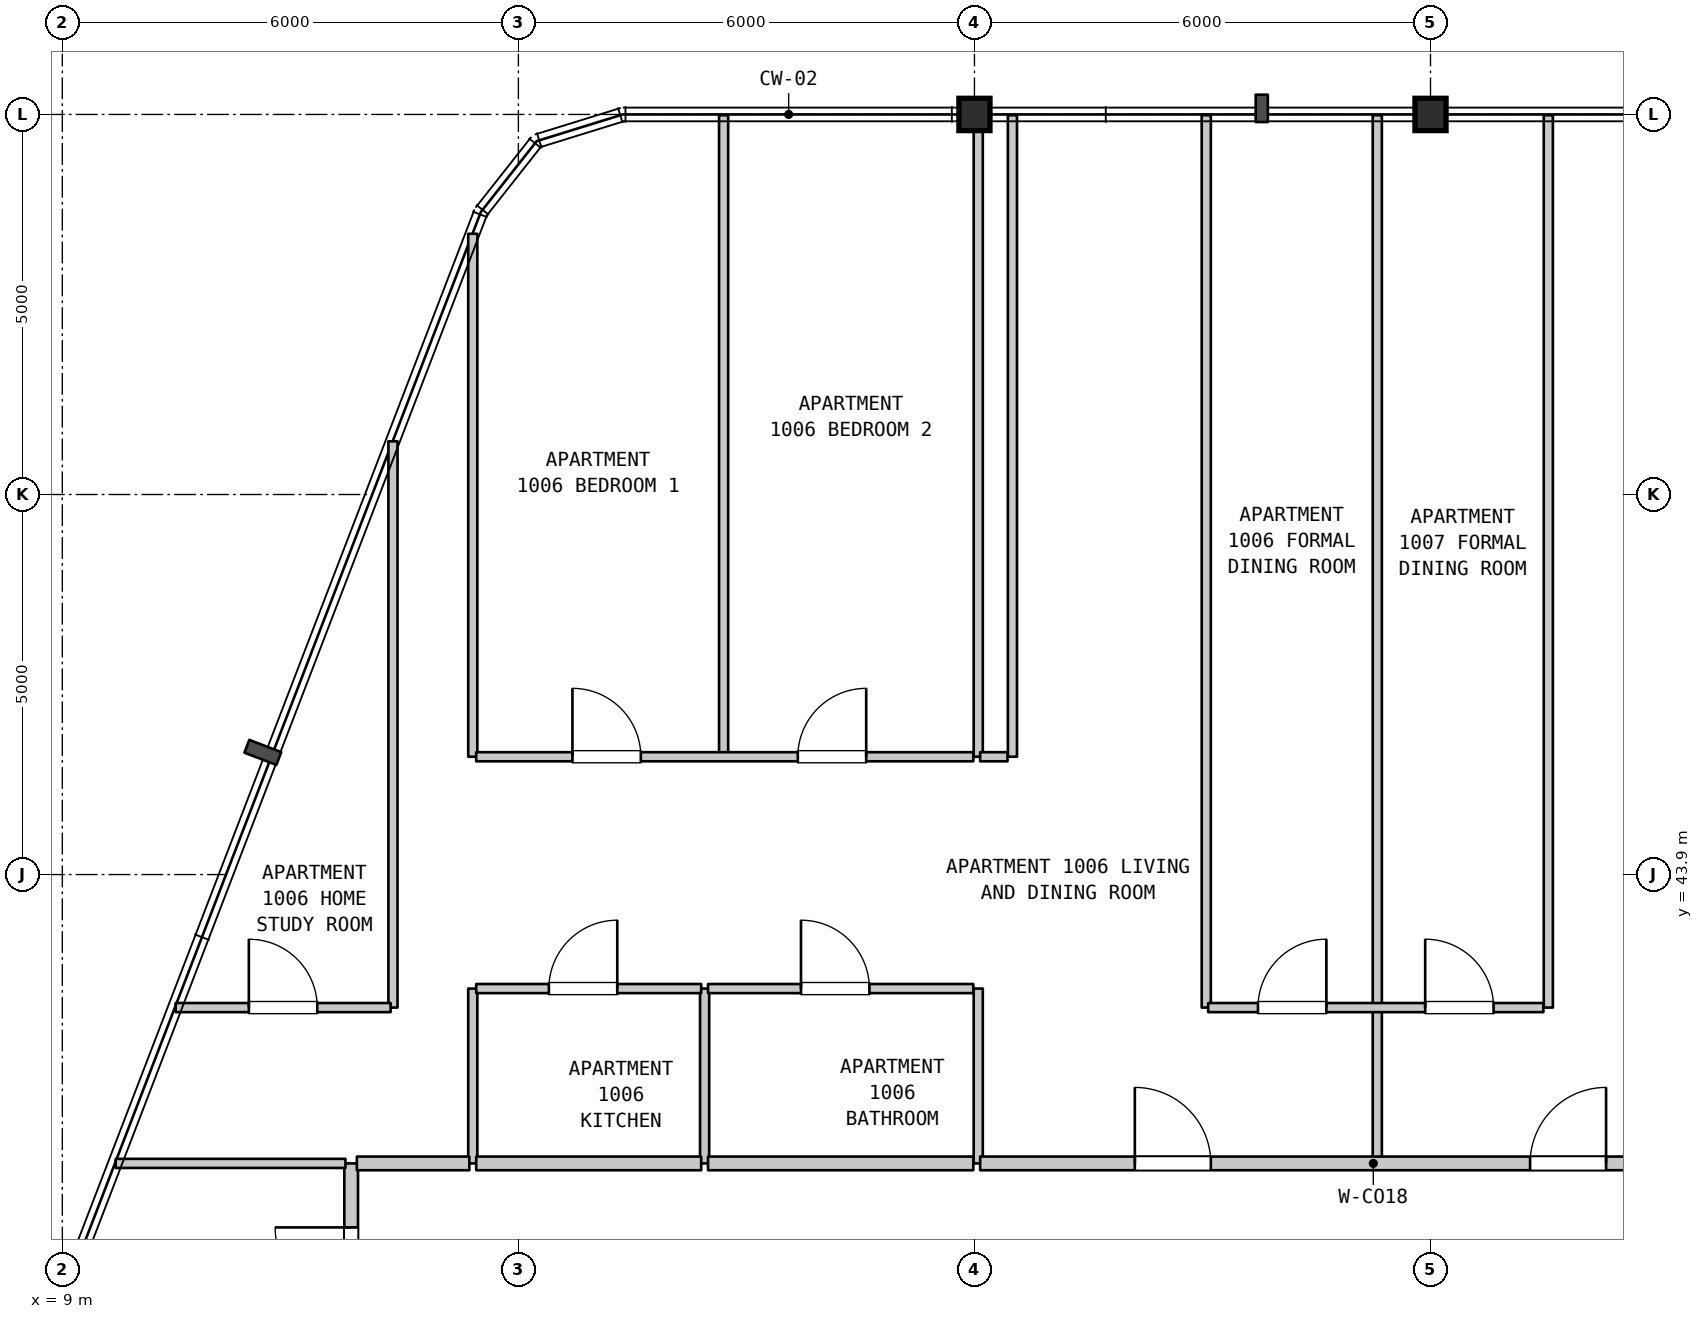
"""IFC4 building model, lengths in metres.
Left out: names, types, materials, properties, quantities, classifications, styles, units other than length and angle.
Written with IfcOpenShell. Run it as: python <this file> out.ifc"""

import sys

from ifc_helpers import new_model, si_unit, direction, frame, frame_2d, origin, origin_2d, place, context, subcontext, project, spatial, rectangle, i_section, extrude, element, fill, save


model = new_model("IFC4")
c1 = context("Model", 3, precision=1e-05, world=origin(), true_north=direction((0.0, 1.0)))
c2 = subcontext(c1, "Body", "Model", "MODEL_VIEW")
j1 = project(units=[si_unit("LENGTHUNIT", "METRE"), si_unit("PLANEANGLEUNIT", "RADIAN")], contexts=[c1])
p1 = place(None, origin())
s1 = spatial("IfcSite", under=j1, at=p1, CompositionType="ELEMENT")
p2 = place(p1, origin())
s2 = spatial("IfcBuilding", under=s1, at=p2, CompositionType="ELEMENT")
p3 = place(p2, frame((0.0, 0.0, 46.2)))
s3 = spatial("IfcBuildingStorey", under=s2, at=p3, CompositionType="ELEMENT", Elevation=46.2)
for number, where, z_axis, x_axis in (
    (1, (21.0, 53.9, 0.0), (0.0, 0.0, 1.0), (1.0, 0.0, 0.0)),
    (2, (27.0, 53.9, 0.0), (0.0, 0.0, 1.0), (1.0, 0.0, 0.0)),
):
    element("IfcColumn", number, at=place(p3, frame(where, z_axis=z_axis, x_axis=x_axis)), inside=s3, PredefinedType="COLUMN", context=c2, shape_type="SweptSolid", body=[
        extrude(i_section(OverallWidth=0.409, OverallDepth=0.425, WebThickness=0.032, FlangeThickness=0.052, FilletRadius=0.015, at=origin_2d()), origin(), (0.0, 0.0, 1.0), 3.7),
    ])
p4 = place(p3, frame((12.8, 37.416, 0.0), z_axis=(0.0, 0.0, 1.0), x_axis=(0.0, 1.0, 0.0)))
e3 = element("IfcWall", 3, at=p4, inside=s3, PredefinedType="STANDARD", context=c2, shape_type="SweptSolid", body=[
    extrude(rectangle(XDim=2.684, YDim=0.18, at=frame_2d((1.342, 0.0))), origin(), (0.0, 0.0, 1.0), 3.385),
])
p5 = place(p4, frame((0.842, 0.0, 0.0)))
e4 = element("IfcOpeningElement", 4, at=p5, cuts=e3, PredefinedType="OPENING", context=c2, shape_type="SweptSolid", body=[
    extrude(rectangle(XDim=1.0, YDim=2.15, at=frame_2d((0.5, 1.075))), frame((0.0, 0.1, 0.0), z_axis=(0.0, -1.0, 0.0), x_axis=(1.0, 0.0, 0.0)), (0.0, 0.0, 1.0), 0.2),
])
p6 = place(p3, frame((13.35, 42.15, 0.0), z_axis=(0.0, 0.0, 1.0), x_axis=(0.0, 1.0, 0.0)))
e5 = element("IfcWall", 5, at=p6, inside=s3, PredefinedType="PARTITIONING", context=c2, shape_type="SweptSolid", body=[
    extrude(rectangle(XDim=7.45, YDim=0.12, at=frame_2d((3.725, 0.0))), origin(), (0.0, 0.0, 1.0), 3.385),
])
p7 = place(p3, frame((14.4, 40.1, 0.0), z_axis=(0.0, 0.0, 1.0), x_axis=(0.0, 1.0, 0.0)))
e6 = element("IfcWall", 6, at=p7, inside=s3, PredefinedType="PARTITIONING", context=c2, shape_type="SweptSolid", body=[
    extrude(rectangle(XDim=2.3, YDim=0.12, at=frame_2d((1.15, 0.0))), origin(), (0.0, 0.0, 1.0), 3.385),
])
p8 = place(p3, frame((14.4, 45.45, 0.0), z_axis=(0.0, 0.0, 1.0), x_axis=(0.0, 1.0, 0.0)))
e7 = element("IfcWall", 7, at=p8, inside=s3, PredefinedType="PARTITIONING", context=c2, shape_type="SweptSolid", body=[
    extrude(rectangle(XDim=6.88, YDim=0.12, at=frame_2d((3.44, 0.0))), origin(), (0.0, 0.0, 1.0), 3.385),
])
p9 = place(p3, frame((17.45, 40.1, 0.0), z_axis=(0.0, 0.0, 1.0), x_axis=(0.0, 1.0, 0.0)))
e8 = element("IfcWall", 8, at=p9, inside=s3, PredefinedType="PARTITIONING", context=c2, shape_type="SweptSolid", body=[
    extrude(rectangle(XDim=2.3, YDim=0.12, at=frame_2d((1.15, 0.0))), origin(), (0.0, 0.0, 1.0), 3.385),
])
p10 = place(p3, frame((17.7, 45.45, 0.0), z_axis=(0.0, 0.0, 1.0), x_axis=(0.0, 1.0, 0.0)))
e9 = element("IfcWall", 9, at=p10, inside=s3, PredefinedType="PARTITIONING", context=c2, shape_type="SweptSolid", body=[
    extrude(rectangle(XDim=8.44, YDim=0.12, at=frame_2d((4.22, 0.0))), origin(), (0.0, 0.0, 1.0), 3.385),
])
p11 = place(p3, frame((21.05, 40.1, 0.0), z_axis=(0.0, 0.0, 1.0), x_axis=(0.0, 1.0, 0.0)))
e10 = element("IfcWall", 10, at=p11, inside=s3, PredefinedType="PARTITIONING", context=c2, shape_type="SweptSolid", body=[
    extrude(rectangle(XDim=2.3, YDim=0.12, at=frame_2d((1.15, 0.0))), origin(), (0.0, 0.0, 1.0), 3.025),
])
p12 = place(p3, frame((21.05, 45.45, 0.0), z_axis=(0.0, 0.0, 1.0), x_axis=(0.0, 1.0, 0.0)))
e11 = element("IfcWall", 11, at=p12, inside=s3, PredefinedType="PARTITIONING", context=c2, shape_type="SweptSolid", body=[
    extrude(rectangle(XDim=8.44, YDim=0.12, at=frame_2d((4.22, 0.0))), origin(), (0.0, 0.0, 1.0), 3.025),
])
p13 = place(p3, frame((21.5, 45.45, 0.0), z_axis=(0.0, 0.0, 1.0), x_axis=(0.0, 1.0, 0.0)))
e12 = element("IfcWall", 12, at=p13, inside=s3, PredefinedType="PARTITIONING", context=c2, shape_type="SweptSolid", body=[
    extrude(rectangle(XDim=8.44, YDim=0.12, at=frame_2d((4.22, 0.0))), origin(), (0.0, 0.0, 1.0), 3.385),
])
p14 = place(p3, frame((24.05, 42.15, 0.0), z_axis=(0.0, 0.0, 1.0), x_axis=(0.0, 1.0, 0.0)))
e13 = element("IfcWall", 13, at=p14, inside=s3, PredefinedType="PARTITIONING", context=c2, shape_type="SweptSolid", body=[
    extrude(rectangle(XDim=11.74, YDim=0.12, at=frame_2d((5.87, 0.0))), origin(), (0.0, 0.0, 1.0), 3.385),
])
p15 = place(p3, frame((26.3, 40.1, 0.0), z_axis=(0.0, 0.0, 1.0), x_axis=(0.0, 1.0, 0.0)))
e14 = element("IfcWall", 14, at=p15, inside=s3, PredefinedType="PARTITIONING", context=c2, shape_type="SweptSolid", body=[
    extrude(rectangle(XDim=2.05, YDim=0.12, at=frame_2d((1.025, 0.0))), origin(), (0.0, 0.0, 1.0), 3.385),
])
for number, where, z_axis, x_axis in (
    (15, (26.3, 42.15, 0.0), (0.0, 0.0, 1.0), (0.0, 1.0, 0.0)),
    (16, (28.55, 42.15, 0.0), (0.0, 0.0, 1.0), (0.0, 1.0, 0.0)),
):
    element("IfcWall", number, at=place(p3, frame(where, z_axis=z_axis, x_axis=x_axis)), inside=s3, PredefinedType="PARTITIONING", context=c2, shape_type="SweptSolid", body=[
        extrude(rectangle(XDim=11.74, YDim=0.12, at=frame_2d((5.87, 0.0))), origin(), (0.0, 0.0, 1.0), 3.385),
    ])
p16 = place(p3, frame((9.702, 40.1, 0.0), z_axis=(0.0, 0.0, 1.0), x_axis=(1.0, 0.0, 0.0)))
e17 = element("IfcWall", 17, at=p16, inside=s3, PredefinedType="PARTITIONING", context=c2, shape_type="SweptSolid", body=[
    extrude(rectangle(XDim=3.023, YDim=0.12, at=frame_2d((1.512, 0.0))), origin(), (0.0, 0.0, 1.0), 3.385),
])
p17 = place(p3, frame((12.875, 40.1, 0.0), z_axis=(0.0, 0.0, 1.0), x_axis=(1.0, 0.0, 0.0)))
e18 = element("IfcWall", 18, at=p17, inside=s3, PredefinedType="STANDARD", context=c2, shape_type="SweptSolid", body=[
    extrude(rectangle(XDim=1.48, YDim=0.18, at=frame_2d((0.74, 0.0))), origin(), (0.0, 0.0, 1.0), 3.385),
])
p18 = place(p3, frame((14.445, 40.1, 0.0), z_axis=(0.0, 0.0, 1.0), x_axis=(1.0, 0.0, 0.0)))
e19 = element("IfcWall", 19, at=p18, inside=s3, PredefinedType="STANDARD", context=c2, shape_type="SweptSolid", body=[
    extrude(rectangle(XDim=2.96, YDim=0.18, at=frame_2d((1.48, 0.0))), origin(), (0.0, 0.0, 1.0), 3.385),
])
p19 = place(p3, frame((17.495, 40.1, 0.0), z_axis=(0.0, 0.0, 1.0), x_axis=(1.0, 0.0, 0.0)))
e20 = element("IfcWall", 20, at=p19, inside=s3, PredefinedType="STANDARD", context=c2, shape_type="SweptSolid", body=[
    extrude(rectangle(XDim=3.49, YDim=0.18, at=frame_2d((1.745, 0.0))), origin(), (0.0, 0.0, 1.0), 3.385),
])
p20 = place(p3, frame((21.075, 40.1, 0.0), z_axis=(0.0, 0.0, 1.0), x_axis=(1.0, 0.0, 0.0)))
e21 = element("IfcWall", 21, at=p20, inside=s3, PredefinedType="STANDARD", context=c2, shape_type="SweptSolid", body=[
    extrude(rectangle(XDim=10.345, YDim=0.18, at=frame_2d((5.172, 0.0))), origin(), (0.0, 0.0, 1.0), 3.385),
])
p21 = place(p20, frame((2.035, 0.0, 0.0)))
e22 = element("IfcOpeningElement", 22, at=p21, cuts=e21, PredefinedType="OPENING", context=c2, shape_type="SweptSolid", body=[
    extrude(rectangle(XDim=1.0, YDim=2.15, at=frame_2d((0.5, 1.075))), frame((0.0, 0.1, 0.0), z_axis=(0.0, -1.0, 0.0), x_axis=(1.0, 0.0, 0.0)), (0.0, 0.0, 1.0), 0.2),
])
p22 = place(p20, frame((7.235, 0.0, 0.0)))
e23 = element("IfcOpeningElement", 23, at=p22, cuts=e21, PredefinedType="OPENING", context=c2, shape_type="SweptSolid", body=[
    extrude(rectangle(XDim=1.0, YDim=2.15, at=frame_2d((0.5, 1.075))), frame((0.0, 0.1, 0.0), z_axis=(0.0, -1.0, 0.0), x_axis=(1.0, 0.0, 0.0)), (0.0, 0.0, 1.0), 0.2),
])
p23 = place(p3, frame((10.491, 42.15, 0.0), z_axis=(0.0, 0.0, 1.0), x_axis=(1.0, 0.0, 0.0)))
e24 = element("IfcWall", 24, at=p23, inside=s3, PredefinedType="PARTITIONING", context=c2, shape_type="SweptSolid", body=[
    extrude(rectangle(XDim=2.828, YDim=0.12, at=frame_2d((1.414, 0.0))), origin(), (0.0, 0.0, 1.0), 3.385),
])
p24 = place(p23, frame((0.963, 0.0, 0.0)))
e25 = element("IfcOpeningElement", 25, at=p24, cuts=e24, PredefinedType="OPENING", context=c2, shape_type="SweptSolid", body=[
    extrude(rectangle(XDim=0.9, YDim=2.15, at=frame_2d((0.45, 1.075))), frame((0.0, 0.07, 0.0), z_axis=(0.0, -1.0, 0.0), x_axis=(1.0, 0.0, 0.0)), (0.0, 0.0, 1.0), 0.14),
])
p25 = place(p3, frame((24.075, 42.15, 0.0), z_axis=(0.0, 0.0, 1.0), x_axis=(1.0, 0.0, 0.0)))
e26 = element("IfcWall", 26, at=p25, inside=s3, PredefinedType="PARTITIONING", context=c2, shape_type="SweptSolid", body=[
    extrude(rectangle(XDim=4.41, YDim=0.12, at=frame_2d((2.205, 0.0))), origin(), (0.0, 0.0, 1.0), 3.385),
])
p26 = place(p25, frame((0.655, 0.0, 0.0)))
e27 = element("IfcOpeningElement", 27, at=p26, cuts=e26, PredefinedType="OPENING", context=c2, shape_type="SweptSolid", body=[
    extrude(rectangle(XDim=0.9, YDim=2.15, at=frame_2d((0.45, 1.075))), frame((0.0, 0.07, 0.0), z_axis=(0.0, -1.0, 0.0), x_axis=(1.0, 0.0, 0.0)), (0.0, 0.0, 1.0), 0.14),
])
p27 = place(p25, frame((2.855, 0.0, 0.0)))
e28 = element("IfcOpeningElement", 28, at=p27, cuts=e26, PredefinedType="OPENING", context=c2, shape_type="SweptSolid", body=[
    extrude(rectangle(XDim=0.9, YDim=2.15, at=frame_2d((0.45, 1.075))), frame((0.0, 0.07, 0.0), z_axis=(0.0, -1.0, 0.0), x_axis=(1.0, 0.0, 0.0)), (0.0, 0.0, 1.0), 0.14),
])
p28 = place(p3, frame((14.445, 42.4, 0.0), z_axis=(0.0, 0.0, 1.0), x_axis=(1.0, 0.0, 0.0)))
e29 = element("IfcWall", 29, at=p28, inside=s3, PredefinedType="PARTITIONING", context=c2, shape_type="SweptSolid", body=[
    extrude(rectangle(XDim=2.96, YDim=0.12, at=frame_2d((1.48, 0.0))), origin(), (0.0, 0.0, 1.0), 3.385),
])
p29 = place(p28, frame((0.956, 0.0, 0.0)))
e30 = element("IfcOpeningElement", 30, at=p29, cuts=e29, PredefinedType="OPENING", context=c2, shape_type="SweptSolid", body=[
    extrude(rectangle(XDim=0.9, YDim=2.15, at=frame_2d((0.45, 1.075))), frame((0.0, 0.07, 0.0), z_axis=(0.0, -1.0, 0.0), x_axis=(1.0, 0.0, 0.0)), (0.0, 0.0, 1.0), 0.14),
])
p30 = place(p3, frame((17.495, 42.4, 0.0), z_axis=(0.0, 0.0, 1.0), x_axis=(1.0, 0.0, 0.0)))
e31 = element("IfcWall", 31, at=p30, inside=s3, PredefinedType="PARTITIONING", context=c2, shape_type="SweptSolid", body=[
    extrude(rectangle(XDim=3.49, YDim=0.12, at=frame_2d((1.745, 0.0))), origin(), (0.0, 0.0, 1.0), 3.385),
])
p31 = place(p30, frame((1.223, 0.0, 0.0)))
e32 = element("IfcOpeningElement", 32, at=p31, cuts=e31, PredefinedType="OPENING", context=c2, shape_type="SweptSolid", body=[
    extrude(rectangle(XDim=0.9, YDim=2.1, at=frame_2d((0.45, 1.05))), frame((0.0, 0.07, 0.0), z_axis=(0.0, -1.0, 0.0), x_axis=(1.0, 0.0, 0.0)), (0.0, 0.0, 1.0), 0.14),
])
p32 = place(p3, frame((14.445, 45.45, 0.0), z_axis=(0.0, 0.0, 1.0), x_axis=(1.0, 0.0, 0.0)))
e33 = element("IfcWall", 33, at=p32, inside=s3, PredefinedType="PARTITIONING", context=c2, shape_type="SweptSolid", body=[
    extrude(rectangle(XDim=6.54, YDim=0.12, at=frame_2d((3.27, 0.0))), origin(), (0.0, 0.0, 1.0), 3.385),
])
p33 = place(p32, frame((1.266, 0.0, 0.0)))
e34 = element("IfcOpeningElement", 34, at=p33, cuts=e33, PredefinedType="OPENING", context=c2, shape_type="SweptSolid", body=[
    extrude(rectangle(XDim=0.9, YDim=2.15, at=frame_2d((0.45, 1.075))), frame((0.0, 0.07, 0.0), z_axis=(0.0, -1.0, 0.0), x_axis=(1.0, 0.0, 0.0)), (0.0, 0.0, 1.0), 0.14),
])
p34 = place(p32, frame((4.231, 0.0, 0.0)))
e35 = element("IfcOpeningElement", 35, at=p34, cuts=e33, PredefinedType="OPENING", context=c2, shape_type="SweptSolid", body=[
    extrude(rectangle(XDim=0.9, YDim=2.15, at=frame_2d((0.45, 1.075))), frame((0.0, 0.07, 0.0), z_axis=(0.0, -1.0, 0.0), x_axis=(1.0, 0.0, 0.0)), (0.0, 0.0, 1.0), 0.14),
])
p35 = place(p3, frame((21.075, 45.45, 0.0), z_axis=(0.0, 0.0, 1.0), x_axis=(1.0, 0.0, 0.0)))
e36 = element("IfcWall", 36, at=p35, inside=s3, PredefinedType="PARTITIONING", context=c2, shape_type="SweptSolid", body=[
    extrude(rectangle(XDim=0.36, YDim=0.12, at=frame_2d((0.18, 0.0))), origin(), (0.0, 0.0, 1.0), 3.385),
])
p36 = place(p5, origin())
e37 = element("IfcDoor", 37, at=p36, inside=s3, OperationType="SINGLE_SWING_RIGHT", PredefinedType="DOOR", context=c2, shape_type="SweptSolid", body=[
    extrude(rectangle(XDim=1.0, YDim=2.15, at=frame_2d((0.5, 1.075))), frame((0.0, 0.025, 0.0), z_axis=(0.0, -1.0, 0.0), x_axis=(1.0, 0.0, 0.0)), (0.0, 0.0, 1.0), 0.05),
])
fill(e4, e37)
p37 = place(p21, origin())
e38 = element("IfcDoor", 38, at=p37, inside=s3, OperationType="SINGLE_SWING_LEFT", PredefinedType="DOOR", context=c2, shape_type="SweptSolid", body=[
    extrude(rectangle(XDim=1.0, YDim=2.15, at=frame_2d((0.5, 1.075))), frame((0.0, 0.025, 0.0), z_axis=(0.0, -1.0, 0.0), x_axis=(1.0, 0.0, 0.0)), (0.0, 0.0, 1.0), 0.05),
])
fill(e22, e38)
p38 = place(p22, origin())
e39 = element("IfcDoor", 39, at=p38, inside=s3, OperationType="SINGLE_SWING_RIGHT", PredefinedType="DOOR", context=c2, shape_type="SweptSolid", body=[
    extrude(rectangle(XDim=1.0, YDim=2.15, at=frame_2d((0.5, 1.075))), frame((0.0, 0.025, 0.0), z_axis=(0.0, -1.0, 0.0), x_axis=(1.0, 0.0, 0.0)), (0.0, 0.0, 1.0), 0.05),
])
fill(e23, e39)
p39 = place(p24, origin())
e40 = element("IfcDoor", 40, at=p39, inside=s3, OperationType="SINGLE_SWING_LEFT", PredefinedType="DOOR", context=c2, shape_type="SweptSolid", body=[
    extrude(rectangle(XDim=0.9, YDim=2.15, at=frame_2d((0.45, 1.075))), frame((0.0, 0.025, 0.0), z_axis=(0.0, -1.0, 0.0), x_axis=(1.0, 0.0, 0.0)), (0.0, 0.0, 1.0), 0.05),
])
fill(e25, e40)
p40 = place(p26, origin())
e41 = element("IfcDoor", 41, at=p40, inside=s3, OperationType="SINGLE_SWING_RIGHT", PredefinedType="DOOR", context=c2, shape_type="SweptSolid", body=[
    extrude(rectangle(XDim=0.9, YDim=2.15, at=frame_2d((0.45, 1.075))), frame((0.0, 0.025, 0.0), z_axis=(0.0, -1.0, 0.0), x_axis=(1.0, 0.0, 0.0)), (0.0, 0.0, 1.0), 0.05),
])
fill(e27, e41)
p41 = place(p27, origin())
e42 = element("IfcDoor", 42, at=p41, inside=s3, OperationType="SINGLE_SWING_LEFT", PredefinedType="DOOR", context=c2, shape_type="SweptSolid", body=[
    extrude(rectangle(XDim=0.9, YDim=2.15, at=frame_2d((0.45, 1.075))), frame((0.0, 0.025, 0.0), z_axis=(0.0, -1.0, 0.0), x_axis=(1.0, 0.0, 0.0)), (0.0, 0.0, 1.0), 0.05),
])
fill(e28, e42)
p42 = place(p29, origin())
e43 = element("IfcDoor", 43, at=p42, inside=s3, OperationType="SINGLE_SWING_RIGHT", PredefinedType="DOOR", context=c2, shape_type="SweptSolid", body=[
    extrude(rectangle(XDim=0.9, YDim=2.15, at=frame_2d((0.45, 1.075))), frame((0.0, 0.025, 0.0), z_axis=(0.0, -1.0, 0.0), x_axis=(1.0, 0.0, 0.0)), (0.0, 0.0, 1.0), 0.05),
])
fill(e30, e43)
p43 = place(p31, origin())
e44 = element("IfcDoor", 44, at=p43, inside=s3, OperationType="SINGLE_SWING_LEFT", PredefinedType="DOOR", context=c2, shape_type="SweptSolid", body=[
    extrude(rectangle(XDim=0.9, YDim=2.1, at=frame_2d((0.45, 1.05))), frame((0.0, 0.025, 0.0), z_axis=(0.0, -1.0, 0.0), x_axis=(1.0, 0.0, 0.0)), (0.0, 0.0, 1.0), 0.05),
])
fill(e32, e44)
p44 = place(p33, origin())
e45 = element("IfcDoor", 45, at=p44, inside=s3, OperationType="SINGLE_SWING_LEFT", PredefinedType="DOOR", context=c2, shape_type="SweptSolid", body=[
    extrude(rectangle(XDim=0.9, YDim=2.15, at=frame_2d((0.45, 1.075))), frame((0.0, 0.025, 0.0), z_axis=(0.0, -1.0, 0.0), x_axis=(1.0, 0.0, 0.0)), (0.0, 0.0, 1.0), 0.05),
])
fill(e34, e45)
p45 = place(p34, origin())
e46 = element("IfcDoor", 46, at=p45, inside=s3, OperationType="SINGLE_SWING_RIGHT", PredefinedType="DOOR", context=c2, shape_type="SweptSolid", body=[
    extrude(rectangle(XDim=0.9, YDim=2.15, at=frame_2d((0.45, 1.075))), frame((0.0, 0.025, 0.0), z_axis=(0.0, -1.0, 0.0), x_axis=(1.0, 0.0, 0.0)), (0.0, 0.0, 1.0), 0.05),
])
fill(e35, e46)
save(model, sys.argv[1])
